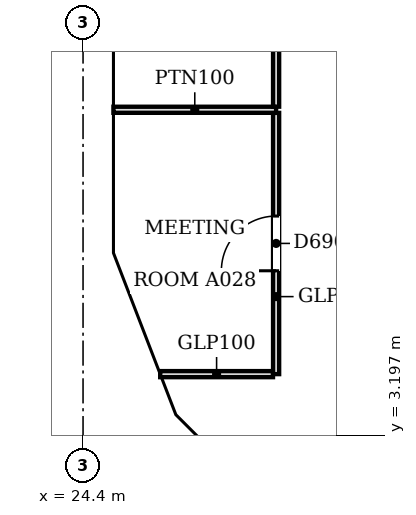
"""IFC4 building model, lengths in metres.
Left out: names, types, materials, properties, quantities, classifications, styles, units other than length and angle.
Written with IfcOpenShell. Run it as: python <this file> out.ifc"""

import sys

from ifc_helpers import new_model, si_unit, direction, frame, frame_2d, origin, place, context, subcontext, project, spatial, polyline, rectangle, outline, extrude, faceted_brep, source, transform, mapped, element, fill, save


model = new_model("IFC4")
c1 = context("Model", 3, precision=1e-05, world=origin(), true_north=direction((0.0, 1.0)))
c2 = subcontext(c1, "Body", "Model", "MODEL_VIEW")
j1 = project(units=[si_unit("LENGTHUNIT", "METRE"), si_unit("PLANEANGLEUNIT", "RADIAN")], contexts=[c1])
p1 = place(None, origin())
s1 = spatial("IfcSite", under=j1, at=p1, CompositionType="ELEMENT")
p2 = place(p1, origin())
s2 = spatial("IfcBuilding", under=s1, at=p2, CompositionType="ELEMENT")
p3 = place(p2, frame((0.0, 0.0, 91.4)))
s3 = spatial("IfcBuildingStorey", under=s2, at=p3, CompositionType="ELEMENT", Elevation=91.4)
m1 = source(origin(), c2, "Body", "Brep", [
    faceted_brep([(3.096, -0.25, 0.0), (6.1, -0.25, 3.8), (3.096, -0.25, 7.6), (0.047, -0.25, 3.857), (0.047, -0.25, 3.743), (0.0, 0.25, 3.8), (3.096, 0.25, 7.6), (6.053, 0.25, 3.859), (6.053, 0.25, 3.741), (3.096, 0.25, 0.0), (6.1, -0.0, 3.8), (0.0, 0.0, 3.8)], [[[0, 1, 2, 3, 4]], [[5, 6, 7, 8, 9]], [[9, 8, 10, 1, 0]], [[7, 6, 2, 1, 10]], [[6, 5, 11, 3, 2]], [[5, 9, 0, 4, 11]], [[11, 4, 3]], [[10, 8, 7]]]),
])
p4 = place(p3, frame((24.65, 12.247, -3.8), z_axis=(0.0, 0.0, 1.0), x_axis=(0.0, -1.0, 0.0)))
e1 = element("IfcWall", 1, at=p4, inside=s3, PredefinedType="SOLIDWALL", context=c2, shape_type="MappedRepresentation", body=[
    mapped(m1, transform((0.0, 0.0, 0.0), scale=1.0)),
])
m2 = source(origin(), c2, "Body", "SweptSolid", [
    extrude(outline(polyline([(3.094, 0.399), (5.781, 3.8), (3.094, 7.2), (0.323, 3.8), (3.094, 0.399)])), frame((0.0, 0.26, 0.0), z_axis=(0.0, -1.0, 0.0), x_axis=(1.0, 0.0, 0.0)), (0.0, 0.0, 1.0), 0.52),
])
p5 = place(p4, origin())
e2 = element("IfcOpeningElement", 2, at=p5, cuts=e1, PredefinedType="OPENING", context=c2, shape_type="MappedRepresentation", body=[
    mapped(m2, transform((0.0, 0.0, 0.0), scale=1.0)),
])
m3 = source(origin(), c2, "Body", "Brep", [
    faceted_brep([(2.95, -0.25, 0.0), (3.003, -0.25, 0.068), (3.003, -0.25, 7.531), (2.95, -0.25, 7.6), (0.0, -0.25, 3.8), (0.047, 0.25, 3.86), (2.898, 0.25, 7.532), (2.898, 0.25, 0.068), (0.047, 0.25, 3.74), (2.95, 0.0, 0.0), (2.95, 0.0, 7.6), (0.0, 0.0, 3.8)], [[[0, 1, 2, 3, 4]], [[5, 6, 7, 8]], [[1, 0, 9]], [[10, 3, 2]], [[6, 5, 11, 4, 3, 10]], [[8, 7, 9, 0, 4, 11]], [[8, 11, 5]], [[1, 9, 7, 6, 10, 2]]]),
])
p6 = place(p3, frame((24.65, 6.146, -3.8), z_axis=(0.0, 0.0, 1.0), x_axis=(0.359953949349, -0.932970071518, 0.0)))
e3 = element("IfcWall", 3, at=p6, inside=s3, PredefinedType="SOLIDWALL", context=c2, shape_type="MappedRepresentation", body=[
    mapped(m3, transform((0.0, 0.0, 0.0), scale=1.0)),
])
m4 = source(origin(), c2, "Body", "SweptSolid", [
    extrude(outline(polyline([(2.75, 6.935), (0.316, 3.8), (2.75, 0.665), (2.75, 6.935)])), frame((0.0, 0.26, 0.0), z_axis=(0.0, -1.0, 0.0), x_axis=(1.0, 0.0, 0.0)), (0.0, 0.0, 1.0), 0.52),
])
p7 = place(p6, origin())
e4 = element("IfcOpeningElement", 4, at=p7, cuts=e3, PredefinedType="OPENING", context=c2, shape_type="MappedRepresentation", body=[
    mapped(m4, transform((0.0, 0.0, 0.0), scale=1.0)),
])
m5 = source(origin(), c2, "Body", "Brep", [
    faceted_brep([(0.053, -0.25, 0.0), (2.997, -0.25, 3.8), (0.053, -0.25, 7.6), (0.0, -0.25, 7.532), (0.0, -0.25, 0.068), (0.106, 0.25, 7.531), (2.944, 0.25, 3.868), (2.944, 0.25, 3.732), (0.106, 0.25, 0.068), (2.997, 0.0, 3.8), (0.053, 0.0, 0.0), (0.053, 0.0, 7.6)], [[[0, 1, 2, 3, 4]], [[5, 6, 7, 8]], [[8, 7, 9, 1, 0, 10]], [[6, 5, 11, 2, 1, 9]], [[3, 2, 11]], [[10, 0, 4]], [[8, 10, 4, 3, 11, 5]], [[9, 7, 6]]]),
])
p8 = place(p3, frame((25.675, 3.431, -3.8), z_axis=(0.0, 0.0, 1.0), x_axis=(0.707106781187, -0.707106781187, 0.0)))
e5 = element("IfcWall", 5, at=p8, inside=s3, PredefinedType="SOLIDWALL", context=c2, shape_type="MappedRepresentation", body=[
    mapped(m5, transform((0.0, 0.0, 0.0), scale=1.0)),
])
m6 = source(origin(), c2, "Body", "SweptSolid", [
    extrude(outline(polyline([(0.253, 0.666), (2.681, 3.8), (0.253, 6.934), (0.253, 0.666)])), frame((0.0, 0.26, 0.0), z_axis=(0.0, -1.0, 0.0), x_axis=(1.0, 0.0, 0.0)), (0.0, 0.0, 1.0), 0.52),
])
p9 = place(p8, origin())
e6 = element("IfcOpeningElement", 6, at=p9, cuts=e5, PredefinedType="OPENING", context=c2, shape_type="MappedRepresentation", body=[
    mapped(m6, transform((0.0, 0.0, 0.0), scale=1.0)),
])
p10 = place(p2, frame((0.0, 0.0, 95.2)))
s4 = spatial("IfcBuildingStorey", under=s2, at=p10, CompositionType="ELEMENT", Elevation=95.2)
m7 = source(origin(), c2, "Body", "Brep", [
    faceted_brep([(0.093, -0.25, 0.057), (3.143, -0.25, 3.8), (0.093, -0.25, 7.543), (0.0, 0.25, 7.544), (0.047, 0.25, 7.6), (3.143, 0.25, 3.8), (0.047, 0.25, 0.0), (0.0, 0.25, 0.056), (0.047, 0.0, 0.0), (0.047, 0.0, 7.6)], [[[0, 1, 2]], [[3, 4, 5, 6, 7]], [[6, 5, 1, 0, 8]], [[5, 4, 9, 2, 1]], [[4, 3, 9]], [[7, 6, 8]], [[7, 8, 0, 2, 9, 3]]]),
])
p11 = place(p10, frame((24.65, 12.293, -3.8), z_axis=(0.0, 0.0, 1.0), x_axis=(0.0, -1.0, 0.0)))
e7 = element("IfcWall", 7, at=p11, inside=s4, PredefinedType="SOLIDWALL", context=c2, shape_type="MappedRepresentation", body=[
    mapped(m7, transform((0.0, 0.0, 0.0), scale=1.0)),
])
m8 = source(origin(), c2, "Body", "SweptSolid", [
    extrude(outline(polyline([(0.247, 0.641), (2.821, 3.8), (0.247, 6.959), (0.247, 0.641)])), frame((0.0, 0.26, 0.0), z_axis=(0.0, -1.0, 0.0), x_axis=(1.0, 0.0, 0.0)), (0.0, 0.0, 1.0), 0.52),
])
p12 = place(p11, origin())
e8 = element("IfcOpeningElement", 8, at=p12, cuts=e7, PredefinedType="OPENING", context=c2, shape_type="MappedRepresentation", body=[
    mapped(m8, transform((0.0, 0.0, 0.0), scale=1.0)),
])
m9 = source(origin(), c2, "Body", "Brep", [
    faceted_brep([(3.003, -0.25, 0.0), (3.05, -0.25, 0.06), (3.05, -0.25, 7.54), (3.003, -0.25, 7.6), (0.0, -0.25, 3.8), (0.0, 0.25, 3.8), (2.957, 0.25, 7.541), (2.957, 0.25, 0.059), (3.003, 0.0, 0.0), (3.003, 0.0, 7.6)], [[[0, 1, 2, 3, 4]], [[5, 6, 7]], [[1, 0, 8]], [[9, 3, 2]], [[6, 5, 4, 3, 9]], [[5, 7, 8, 0, 4]], [[1, 8, 7, 6, 9, 2]]]),
])
p13 = place(p10, frame((24.65, 9.15, -3.8), z_axis=(0.0, 0.0, 1.0), x_axis=(0.0, -1.0, 0.0)))
e9 = element("IfcWall", 9, at=p13, inside=s4, PredefinedType="SOLIDWALL", context=c2, shape_type="MappedRepresentation", body=[
    mapped(m9, transform((0.0, 0.0, 0.0), scale=1.0)),
])
m10 = source(origin(), c2, "Body", "SweptSolid", [
    extrude(outline(polyline([(2.803, 6.944), (0.319, 3.8), (2.803, 0.656), (2.803, 6.944)])), frame((0.0, 0.26, 0.0), z_axis=(0.0, -1.0, 0.0), x_axis=(1.0, 0.0, 0.0)), (0.0, 0.0, 1.0), 0.52),
])
p14 = place(p13, origin())
e10 = element("IfcOpeningElement", 10, at=p14, cuts=e9, PredefinedType="OPENING", context=c2, shape_type="MappedRepresentation", body=[
    mapped(m10, transform((0.0, 0.0, 0.0), scale=1.0)),
])
m11 = source(origin(), c2, "Body", "Brep", [
    faceted_brep([(0.047, -0.25, 0.0), (2.997, -0.25, 3.8), (0.047, -0.25, 7.6), (0.0, -0.25, 7.541), (0.0, -0.25, 0.059), (0.093, 0.25, 7.54), (2.944, 0.25, 3.868), (2.944, 0.25, 3.732), (0.093, 0.25, 0.06), (2.997, 0.0, 3.8), (0.047, 0.0, 0.0), (0.047, 0.0, 7.6)], [[[0, 1, 2, 3, 4]], [[5, 6, 7, 8]], [[8, 7, 9, 1, 0, 10]], [[6, 5, 11, 2, 1, 9]], [[3, 2, 11]], [[10, 0, 4]], [[8, 10, 4, 3, 11, 5]], [[9, 7, 6]]]),
])
p15 = place(p10, frame((24.633, 6.19, -3.8), z_axis=(0.0, 0.0, 1.0), x_axis=(0.359901446078, -0.932990326376, 0.0)))
e11 = element("IfcWall", 11, at=p15, inside=s4, PredefinedType="SOLIDWALL", context=c2, shape_type="MappedRepresentation", body=[
    mapped(m11, transform((0.0, 0.0, 0.0), scale=1.0)),
])
m12 = source(origin(), c2, "Body", "SweptSolid", [
    extrude(outline(polyline([(0.247, 0.665), (2.681, 3.8), (0.247, 6.935), (0.247, 0.665)])), frame((0.0, 0.26, 0.0), z_axis=(0.0, -1.0, 0.0), x_axis=(1.0, 0.0, 0.0)), (0.0, 0.0, 1.0), 0.52),
])
p16 = place(p15, origin())
e12 = element("IfcOpeningElement", 12, at=p16, cuts=e11, PredefinedType="OPENING", context=c2, shape_type="MappedRepresentation", body=[
    mapped(m12, transform((0.0, 0.0, 0.0), scale=1.0)),
])
m13 = source(origin(), c2, "Body", "Brep", [
    faceted_brep([(2.944, -0.25, 0.0), (2.997, -0.25, 0.068), (2.997, -0.25, 7.532), (2.944, -0.25, 7.6), (0.0, -0.25, 3.8), (0.053, 0.25, 3.868), (2.891, 0.25, 7.532), (2.891, 0.25, 0.068), (0.053, 0.25, 3.732), (2.944, 0.0, 0.0), (2.944, 0.0, 7.6), (0.0, 0.0, 3.8)], [[[0, 1, 2, 3, 4]], [[5, 6, 7, 8]], [[1, 0, 9]], [[10, 3, 2]], [[6, 5, 11, 4, 3, 10]], [[8, 7, 9, 0, 4, 11]], [[8, 11, 5]], [[1, 9, 7, 6, 10, 2]]]),
])
p17 = place(p10, frame((25.712, 3.394, -3.8), z_axis=(0.0, 0.0, 1.0), x_axis=(0.707066050402, -0.707147509625, 0.0)))
e13 = element("IfcWall", 13, at=p17, inside=s4, PredefinedType="SOLIDWALL", context=c2, shape_type="MappedRepresentation", body=[
    mapped(m13, transform((0.0, 0.0, 0.0), scale=1.0)),
])
m14 = source(origin(), c2, "Body", "SweptSolid", [
    extrude(outline(polyline([(2.744, 6.934), (0.316, 3.8), (2.744, 0.667), (2.744, 6.934)])), frame((0.0, 0.26, 0.0), z_axis=(0.0, -1.0, 0.0), x_axis=(1.0, 0.0, 0.0)), (0.0, 0.0, 1.0), 0.52),
])
p18 = place(p17, origin())
e14 = element("IfcOpeningElement", 14, at=p18, cuts=e13, PredefinedType="OPENING", context=c2, shape_type="MappedRepresentation", body=[
    mapped(m14, transform((0.0, 0.0, 0.0), scale=1.0)),
])
p19 = place(p3, frame((25.669, 4.2, 0.0), z_axis=(0.0, 0.0, 1.0), x_axis=(1.0, 0.0, 0.0)))
e15 = element("IfcWall", 15, at=p19, inside=s3, PredefinedType="PARTITIONING", context=c2, shape_type="SweptSolid", body=[
    extrude(rectangle(XDim=1.855, YDim=0.1, at=frame_2d((0.928, 0.0))), origin(), (0.0, 0.0, 1.0), 2.895),
])
p20 = place(p3, frame((27.575, 4.2, 0.0), z_axis=(0.0, 0.0, 1.0), x_axis=(0.0, 1.0, 0.0)))
e16 = element("IfcWall", 16, at=p20, inside=s3, PredefinedType="PARTITIONING", context=c2, shape_type="SweptSolid", body=[
    extrude(rectangle(XDim=4.297, YDim=0.1, at=frame_2d((2.148, 0.0))), origin(), (0.0, 0.0, 1.0), 2.895),
])
m15 = source(origin(), c2, "Body", "SweptSolid", [
    extrude(rectangle(XDim=0.9, YDim=2.1, at=frame_2d((0.45, 1.05))), frame((0.0, 0.06, 0.0), z_axis=(0.0, -1.0, 0.0), x_axis=(1.0, 0.0, 0.0)), (0.0, 0.0, 1.0), 0.12),
])
p21 = place(p20, frame((1.7, 0.0, 0.0)))
e17 = element("IfcOpeningElement", 17, at=p21, cuts=e16, PredefinedType="OPENING", context=c2, shape_type="MappedRepresentation", body=[
    mapped(m15, transform((0.0, 0.0, 0.0), scale=1.0)),
])
p22 = place(p3, frame((24.9, 8.548, 0.0), z_axis=(0.0, 0.0, 1.0), x_axis=(1.0, 0.0, 0.0)))
e18 = element("IfcWall", 18, at=p22, inside=s3, PredefinedType="PARTITIONING", context=c2, shape_type="SweptSolid", body=[
    extrude(rectangle(XDim=2.675, YDim=0.1, at=frame_2d((1.337, 0.0))), origin(), (0.0, 0.0, 1.0), 2.895),
])
p23 = place(p3, frame((27.575, 8.599, 0.0), z_axis=(0.0, 0.0, 1.0), x_axis=(0.0, 1.0, 0.0)))
e19 = element("IfcWall", 19, at=p23, inside=s3, PredefinedType="PARTITIONING", context=c2, shape_type="SweptSolid", body=[
    extrude(rectangle(XDim=4.525, YDim=0.1, at=frame_2d((2.263, 0.0))), origin(), (0.0, 0.0, 1.0), 2.895),
])
p24 = place(p23, frame((1.8, 0.0, 0.0)))
e20 = element("IfcOpeningElement", 20, at=p24, cuts=e19, PredefinedType="OPENING", context=c2, shape_type="MappedRepresentation", body=[
    mapped(m15, transform((0.0, 0.0, 0.0), scale=1.0)),
])
m16 = source(origin(), c2, "Body", "SweptSolid", [
    extrude(rectangle(XDim=0.9, YDim=2.1, at=frame_2d((0.45, 1.05))), frame((0.0, 0.025, 0.0), z_axis=(0.0, -1.0, 0.0), x_axis=(1.0, 0.0, 0.0)), (0.0, 0.0, 1.0), 0.05),
])
p25 = place(p21, origin())
e21 = element("IfcDoor", 21, at=p25, inside=s3, OperationType="SINGLE_SWING_LEFT", PredefinedType="DOOR", context=c2, shape_type="MappedRepresentation", body=[
    mapped(m16, transform((0.0, 0.0, 0.0), scale=1.0)),
])
fill(e17, e21)
save(model, sys.argv[1])
